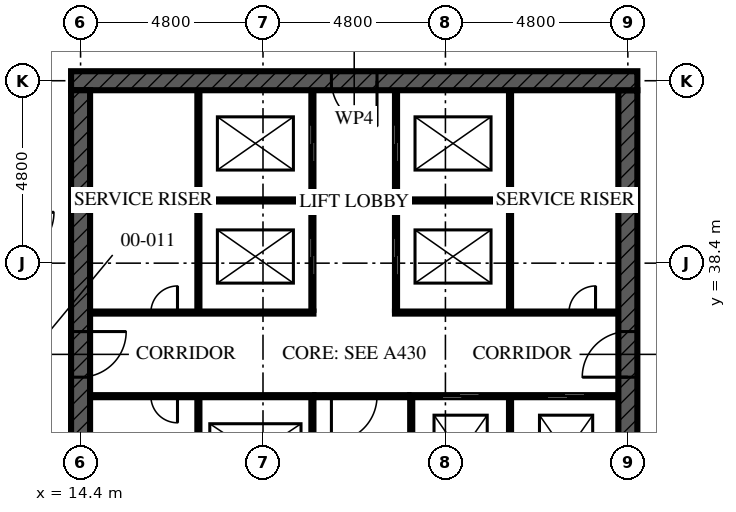
"""IFC4 building model, lengths in metres.
Left out: names, types, materials, properties, quantities, classifications, styles, units other than length and angle.
Written with IfcOpenShell. Run it as: python <this file> out.ifc"""

import sys

from ifc_helpers import new_model, si_unit, direction, frame, frame_2d, origin, place, context, subcontext, project, spatial, rectangle, extrude, element, fill, save


model = new_model("IFC4")
c1 = context("Model", 3, precision=1e-05, world=origin(), true_north=direction((0.0, 1.0)))
c2 = subcontext(c1, "Body", "Model", "MODEL_VIEW")
j1 = project(units=[si_unit("LENGTHUNIT", "METRE"), si_unit("PLANEANGLEUNIT", "RADIAN")], contexts=[c1])
p1 = place(None, origin())
s1 = spatial("IfcSite", under=j1, at=p1, CompositionType="ELEMENT")
p2 = place(p1, origin())
s2 = spatial("IfcBuilding", under=s1, at=p2, CompositionType="ELEMENT")
p3 = place(p2, origin())
s3 = spatial("IfcBuildingStorey", under=s2, at=p3, CompositionType="ELEMENT", Elevation=0.0)
p4 = place(p3, frame((29.05, 43.2, -1.8), z_axis=(0.0, 0.0, 1.0), x_axis=(-1.0, 0.0, 0.0)))
e1 = element("IfcWall", 1, at=p4, inside=s3, PredefinedType="SHEAR", context=c2, shape_type="SweptSolid", body=[
    extrude(rectangle(XDim=14.9, YDim=0.5, at=frame_2d((7.45, 0.0))), origin(), (0.0, 0.0, 1.0), 6.13),
])
p5 = place(p4, frame((6.85, 0.0, 1.8)))
e2 = element("IfcOpeningElement", 2, at=p5, cuts=e1, PredefinedType="OPENING", context=c2, shape_type="SweptSolid", body=[
    extrude(rectangle(XDim=1.2, YDim=2.1, at=frame_2d((0.6, 1.05))), frame((0.0, 0.26, 0.0), z_axis=(0.0, -1.0, 0.0), x_axis=(1.0, 0.0, 0.0)), (0.0, 0.0, 1.0), 0.521),
])
p6 = place(p3, frame((14.4, 42.95, -1.8), z_axis=(0.0, 0.0, 1.0), x_axis=(0.0, -1.0, 0.0)))
e3 = element("IfcWall", 3, at=p6, inside=s3, PredefinedType="SHEAR", context=c2, shape_type="SweptSolid", body=[
    extrude(rectangle(XDim=13.9, YDim=0.5, at=frame_2d((6.95, 0.0))), origin(), (0.0, 0.0, 1.0), 6.13),
])
p7 = place(p6, frame((6.35, 0.0, 1.8)))
e4 = element("IfcOpeningElement", 4, at=p7, cuts=e3, PredefinedType="OPENING", context=c2, shape_type="SweptSolid", body=[
    extrude(rectangle(XDim=1.2, YDim=2.1, at=frame_2d((0.6, 1.05))), frame((0.0, 0.26, 0.0), z_axis=(0.0, -1.0, 0.0), x_axis=(1.0, 0.0, 0.0)), (0.0, 0.0, 1.0), 0.521),
])
p8 = place(p3, frame((28.8, 29.05, -1.8), z_axis=(0.0, 0.0, 1.0), x_axis=(0.0, 1.0, 0.0)))
e5 = element("IfcWall", 5, at=p8, inside=s3, PredefinedType="SHEAR", context=c2, shape_type="SweptSolid", body=[
    extrude(rectangle(XDim=13.9, YDim=0.5, at=frame_2d((6.95, 0.0))), origin(), (0.0, 0.0, 1.0), 6.13),
])
p9 = place(p8, frame((6.35, 0.0, 1.8)))
e6 = element("IfcOpeningElement", 6, at=p9, cuts=e5, PredefinedType="OPENING", context=c2, shape_type="SweptSolid", body=[
    extrude(rectangle(XDim=1.2, YDim=2.1, at=frame_2d((0.6, 1.05))), frame((0.0, 0.26, 0.0), z_axis=(0.0, -1.0, 0.0), x_axis=(1.0, 0.0, 0.0)), (0.0, 0.0, 1.0), 0.521),
])
p10 = place(p3, frame((20.5, 29.05, -1.8), z_axis=(0.0, 0.0, 1.0), x_axis=(0.0, 1.0, 0.0)))
e7 = element("IfcWall", 7, at=p10, inside=s3, PredefinedType="SOLIDWALL", context=c2, shape_type="SweptSolid", body=[
    extrude(rectangle(XDim=5.8, YDim=0.1, at=frame_2d((2.9, 0.0))), origin(), (0.0, 0.0, 1.0), 6.13),
])
p11 = place(p10, frame((0.8, 0.0, 1.8)))
e8 = element("IfcOpeningElement", 8, at=p11, cuts=e7, PredefinedType="OPENING", context=c2, shape_type="SweptSolid", body=[
    extrude(rectangle(XDim=1.1, YDim=2.3, at=frame_2d((0.55, 1.15))), frame((0.0, 0.061, 0.0), z_axis=(0.0, -1.0, 0.0), x_axis=(1.0, 0.0, 0.0)), (0.0, 0.0, 1.0), 0.121),
])
p12 = place(p10, frame((3.775, 0.0, 1.8)))
e9 = element("IfcOpeningElement", 9, at=p12, cuts=e7, PredefinedType="OPENING", context=c2, shape_type="SweptSolid", body=[
    extrude(rectangle(XDim=1.1, YDim=2.3, at=frame_2d((0.55, 1.15))), frame((0.0, 0.061, 0.0), z_axis=(0.0, -1.0, 0.0), x_axis=(1.0, 0.0, 0.0)), (0.0, 0.0, 1.0), 0.121),
])
p13 = place(p3, frame((20.5, 37.15, -1.8), z_axis=(0.0, 0.0, 1.0), x_axis=(0.0, 1.0, 0.0)))
e10 = element("IfcWall", 10, at=p13, inside=s3, PredefinedType="SOLIDWALL", context=c2, shape_type="SweptSolid", body=[
    extrude(rectangle(XDim=5.8, YDim=0.1, at=frame_2d((2.9, 0.0))), origin(), (0.0, 0.0, 1.0), 6.13),
])
p14 = place(p13, frame((0.925, 0.0, 1.8)))
e11 = element("IfcOpeningElement", 11, at=p14, cuts=e10, PredefinedType="OPENING", context=c2, shape_type="SweptSolid", body=[
    extrude(rectangle(XDim=1.0, YDim=2.1, at=frame_2d((0.5, 1.05))), frame((0.0, 0.061, 0.0), z_axis=(0.0, -1.0, 0.0), x_axis=(1.0, 0.0, 0.0)), (0.0, 0.0, 1.0), 0.121),
])
p15 = place(p13, frame((3.9, 0.0, 1.8)))
e12 = element("IfcOpeningElement", 12, at=p15, cuts=e10, PredefinedType="OPENING", context=c2, shape_type="SweptSolid", body=[
    extrude(rectangle(XDim=1.0, YDim=2.1, at=frame_2d((0.5, 1.05))), frame((0.0, 0.061, 0.0), z_axis=(0.0, -1.0, 0.0), x_axis=(1.0, 0.0, 0.0)), (0.0, 0.0, 1.0), 0.121),
])
p16 = place(p3, frame((22.7, 37.15, -1.8), z_axis=(0.0, 0.0, 1.0), x_axis=(0.0, 1.0, 0.0)))
e13 = element("IfcWall", 13, at=p16, inside=s3, PredefinedType="SOLIDWALL", context=c2, shape_type="SweptSolid", body=[
    extrude(rectangle(XDim=5.8, YDim=0.1, at=frame_2d((2.9, 0.0))), origin(), (0.0, 0.0, 1.0), 6.13),
])
p17 = place(p16, frame((0.925, 0.0, 1.8)))
e14 = element("IfcOpeningElement", 14, at=p17, cuts=e13, PredefinedType="OPENING", context=c2, shape_type="SweptSolid", body=[
    extrude(rectangle(XDim=1.0, YDim=2.1, at=frame_2d((0.5, 1.05))), frame((0.0, 0.061, 0.0), z_axis=(0.0, -1.0, 0.0), x_axis=(1.0, 0.0, 0.0)), (0.0, 0.0, 1.0), 0.121),
])
p18 = place(p16, frame((3.9, 0.0, 1.8)))
e15 = element("IfcOpeningElement", 15, at=p18, cuts=e13, PredefinedType="OPENING", context=c2, shape_type="SweptSolid", body=[
    extrude(rectangle(XDim=1.0, YDim=2.1, at=frame_2d((0.5, 1.05))), frame((0.0, 0.061, 0.0), z_axis=(0.0, -1.0, 0.0), x_axis=(1.0, 0.0, 0.0)), (0.0, 0.0, 1.0), 0.121),
])
p19 = place(p3, frame((23.1, 29.05, -1.8), z_axis=(0.0, 0.0, 1.0), x_axis=(0.0, 1.0, 0.0)))
e16 = element("IfcWall", 16, at=p19, inside=s3, PredefinedType="SOLIDWALL", context=c2, shape_type="SweptSolid", body=[
    extrude(rectangle(XDim=5.8, YDim=0.1, at=frame_2d((2.9, 0.0))), origin(), (0.0, 0.0, 1.0), 6.13),
])
p20 = place(p19, frame((1.0, 0.0, 1.8)))
e17 = element("IfcOpeningElement", 17, at=p20, cuts=e16, PredefinedType="OPENING", context=c2, shape_type="SweptSolid", body=[
    extrude(rectangle(XDim=0.7, YDim=2.1, at=frame_2d((0.35, 1.05))), frame((0.0, 0.061, 0.0), z_axis=(0.0, -1.0, 0.0), x_axis=(1.0, 0.0, 0.0)), (0.0, 0.0, 1.0), 0.121),
])
p21 = place(p3, frame((14.65, 34.9, -1.8), z_axis=(0.0, 0.0, 1.0), x_axis=(1.0, 0.0, 0.0)))
e18 = element("IfcWall", 18, at=p21, inside=s3, PredefinedType="SOLIDWALL", context=c2, shape_type="SweptSolid", body=[
    extrude(rectangle(XDim=5.9, YDim=0.1, at=frame_2d((2.95, 0.0))), origin(), (0.0, 0.0, 1.0), 6.13),
])
p22 = place(p21, frame((1.6, 0.0, 1.8)))
e19 = element("IfcOpeningElement", 19, at=p22, cuts=e18, PredefinedType="OPENING", context=c2, shape_type="SweptSolid", body=[
    extrude(rectangle(XDim=0.7, YDim=2.1, at=frame_2d((0.35, 1.05))), frame((0.0, 0.061, 0.0), z_axis=(0.0, -1.0, 0.0), x_axis=(1.0, 0.0, 0.0)), (0.0, 0.0, 1.0), 0.121),
])
p23 = place(p3, frame((23.05, 34.9, -1.8), z_axis=(0.0, 0.0, 1.0), x_axis=(1.0, 0.0, 0.0)))
e20 = element("IfcWall", 20, at=p23, inside=s3, PredefinedType="SOLIDWALL", context=c2, shape_type="SweptSolid", body=[
    extrude(rectangle(XDim=5.5, YDim=0.1, at=frame_2d((2.75, 0.0))), origin(), (0.0, 0.0, 1.0), 6.13),
])
p24 = place(p23, frame((0.85, 0.0, 1.8)))
e21 = element("IfcOpeningElement", 21, at=p24, cuts=e20, PredefinedType="OPENING", context=c2, shape_type="SweptSolid", body=[
    extrude(rectangle(XDim=1.0, YDim=2.1, at=frame_2d((0.5, 1.05))), frame((0.0, 0.061, 0.0), z_axis=(0.0, -1.0, 0.0), x_axis=(1.0, 0.0, 0.0)), (0.0, 0.0, 1.0), 0.121),
])
p25 = place(p23, frame((3.625, 0.0, 1.8)))
e22 = element("IfcOpeningElement", 22, at=p25, cuts=e20, PredefinedType="OPENING", context=c2, shape_type="SweptSolid", body=[
    extrude(rectangle(XDim=1.0, YDim=2.1, at=frame_2d((0.5, 1.05))), frame((0.0, 0.061, 0.0), z_axis=(0.0, -1.0, 0.0), x_axis=(1.0, 0.0, 0.0)), (0.0, 0.0, 1.0), 0.121),
])
p26 = place(p3, frame((14.65, 37.1, -1.8), z_axis=(0.0, 0.0, 1.0), x_axis=(1.0, 0.0, 0.0)))
e23 = element("IfcWall", 23, at=p26, inside=s3, PredefinedType="SOLIDWALL", context=c2, shape_type="SweptSolid", body=[
    extrude(rectangle(XDim=5.9, YDim=0.1, at=frame_2d((2.95, 0.0))), origin(), (0.0, 0.0, 1.0), 6.13),
])
p27 = place(p26, frame((1.6, 0.0, 1.8)))
e24 = element("IfcOpeningElement", 24, at=p27, cuts=e23, PredefinedType="OPENING", context=c2, shape_type="SweptSolid", body=[
    extrude(rectangle(XDim=0.7, YDim=2.1, at=frame_2d((0.35, 1.05))), frame((0.0, 0.061, 0.0), z_axis=(0.0, -1.0, 0.0), x_axis=(1.0, 0.0, 0.0)), (0.0, 0.0, 1.0), 0.121),
])
p28 = place(p3, frame((22.65, 37.1, -1.8), z_axis=(0.0, 0.0, 1.0), x_axis=(1.0, 0.0, 0.0)))
e25 = element("IfcWall", 25, at=p28, inside=s3, PredefinedType="SOLIDWALL", context=c2, shape_type="SweptSolid", body=[
    extrude(rectangle(XDim=5.9, YDim=0.1, at=frame_2d((2.95, 0.0))), origin(), (0.0, 0.0, 1.0), 6.13),
])
p29 = place(p28, frame((4.6, 0.0, 1.8)))
e26 = element("IfcOpeningElement", 26, at=p29, cuts=e25, PredefinedType="OPENING", context=c2, shape_type="SweptSolid", body=[
    extrude(rectangle(XDim=0.7, YDim=2.1, at=frame_2d((0.35, 1.05))), frame((0.0, 0.061, 0.0), z_axis=(0.0, -1.0, 0.0), x_axis=(1.0, 0.0, 0.0)), (0.0, 0.0, 1.0), 0.121),
])
p30 = place(p3, frame((20.55, 34.9, -1.8), z_axis=(0.0, 0.0, 1.0), x_axis=(1.0, 0.0, 0.0)))
e27 = element("IfcWall", 27, at=p30, inside=s3, PredefinedType="SOLIDWALL", context=c2, shape_type="SweptSolid", body=[
    extrude(rectangle(XDim=2.5, YDim=0.1, at=frame_2d((1.25, 0.0))), origin(), (0.0, 0.0, 1.0), 6.13),
])
p31 = place(p30, frame((0.45, 0.0, 1.8)))
e28 = element("IfcOpeningElement", 28, at=p31, cuts=e27, PredefinedType="OPENING", context=c2, shape_type="SweptSolid", body=[
    extrude(rectangle(XDim=1.2, YDim=2.1, at=frame_2d((0.6, 1.05))), frame((0.0, 0.061, 0.0), z_axis=(0.0, -1.0, 0.0), x_axis=(1.0, 0.0, 0.0)), (0.0, 0.0, 1.0), 0.121),
])
for number, where, z_axis, x_axis in (
    (29, (17.5, 29.05, -1.8), (0.0, 0.0, 1.0), (0.0, 1.0, 0.0)),
    (30, (17.5, 37.15, -1.8), (0.0, 0.0, 1.0), (0.0, 1.0, 0.0)),
):
    element("IfcWall", number, at=place(p3, frame(where, z_axis=z_axis, x_axis=x_axis)), inside=s3, PredefinedType="SOLIDWALL", context=c2, shape_type="SweptSolid", body=[
        extrude(rectangle(XDim=5.8, YDim=0.1, at=frame_2d((2.9, 0.0))), origin(), (0.0, 0.0, 1.0), 6.13),
    ])
for number, where, z_axis, x_axis in (
    (31, (17.55, 40.05, -1.8), (0.0, 0.0, 1.0), (1.0, 0.0, 0.0)),
    (32, (22.75, 40.05, -1.8), (0.0, 0.0, 1.0), (1.0, 0.0, 0.0)),
):
    element("IfcWall", number, at=place(p3, frame(where, z_axis=z_axis, x_axis=x_axis)), inside=s3, PredefinedType="SOLIDWALL", context=c2, shape_type="SweptSolid", body=[
        extrude(rectangle(XDim=2.9, YDim=0.1, at=frame_2d((1.45, 0.0))), origin(), (0.0, 0.0, 1.0), 6.13),
    ])
p32 = place(p3, frame((25.7, 37.15, -1.8), z_axis=(0.0, 0.0, 1.0), x_axis=(0.0, 1.0, 0.0)))
e33 = element("IfcWall", 33, at=p32, inside=s3, PredefinedType="SOLIDWALL", context=c2, shape_type="SweptSolid", body=[
    extrude(rectangle(XDim=5.8, YDim=0.1, at=frame_2d((2.9, 0.0))), origin(), (0.0, 0.0, 1.0), 6.13),
])
p33 = place(p3, frame((25.7, 31.95, -1.8), z_axis=(0.0, 0.0, 1.0), x_axis=(0.0, 1.0, 0.0)))
e34 = element("IfcWall", 34, at=p33, inside=s3, PredefinedType="SOLIDWALL", context=c2, shape_type="SweptSolid", body=[
    extrude(rectangle(XDim=2.9, YDim=0.1, at=frame_2d((1.45, 0.0))), origin(), (0.0, 0.0, 1.0), 6.13),
])
p34 = place(p14, origin())
e35 = element("IfcDoor", 35, at=p34, inside=s3, OperationType="SLIDING_TO_LEFT", PredefinedType="DOOR", context=c2, shape_type="SweptSolid", body=[
    extrude(rectangle(XDim=1.0, YDim=2.1, at=frame_2d((0.5, 1.05))), frame((0.0, 0.05, 0.0), z_axis=(0.0, -1.0, 0.0), x_axis=(1.0, 0.0, 0.0)), (0.0, 0.0, 1.0), 0.1),
])
fill(e11, e35)
p35 = place(p15, origin())
e36 = element("IfcDoor", 36, at=p35, inside=s3, OperationType="SLIDING_TO_LEFT", PredefinedType="DOOR", context=c2, shape_type="SweptSolid", body=[
    extrude(rectangle(XDim=1.0, YDim=2.1, at=frame_2d((0.5, 1.05))), frame((0.0, 0.05, 0.0), z_axis=(0.0, -1.0, 0.0), x_axis=(1.0, 0.0, 0.0)), (0.0, 0.0, 1.0), 0.1),
])
fill(e12, e36)
p36 = place(p17, origin())
e37 = element("IfcDoor", 37, at=p36, inside=s3, OperationType="SLIDING_TO_LEFT", PredefinedType="DOOR", context=c2, shape_type="SweptSolid", body=[
    extrude(rectangle(XDim=1.0, YDim=2.1, at=frame_2d((0.5, 1.05))), frame((0.0, 0.05, 0.0), z_axis=(0.0, -1.0, 0.0), x_axis=(1.0, 0.0, 0.0)), (0.0, 0.0, 1.0), 0.1),
])
fill(e14, e37)
p37 = place(p18, origin())
e38 = element("IfcDoor", 38, at=p37, inside=s3, OperationType="SLIDING_TO_LEFT", PredefinedType="DOOR", context=c2, shape_type="SweptSolid", body=[
    extrude(rectangle(XDim=1.0, YDim=2.1, at=frame_2d((0.5, 1.05))), frame((0.0, 0.05, 0.0), z_axis=(0.0, -1.0, 0.0), x_axis=(1.0, 0.0, 0.0)), (0.0, 0.0, 1.0), 0.1),
])
fill(e15, e38)
p38 = place(p22, frame((0.7, 0.0, 0.0), z_axis=(0.0, 0.0, 1.0), x_axis=(-1.0, 0.0, 0.0)))
e39 = element("IfcDoor", 39, at=p38, inside=s3, OperationType="SINGLE_SWING_RIGHT", PredefinedType="DOOR", context=c2, shape_type="SweptSolid", body=[
    extrude(rectangle(XDim=0.7, YDim=2.1, at=frame_2d((0.35, 1.05))), frame((0.0, 0.027, 0.0), z_axis=(0.0, -1.0, 0.0), x_axis=(1.0, 0.0, 0.0)), (0.0, 0.0, 1.0), 0.054),
])
fill(e19, e39)
p39 = place(p24, origin())
e40 = element("IfcDoor", 40, at=p39, inside=s3, OperationType="SLIDING_TO_LEFT", PredefinedType="DOOR", context=c2, shape_type="SweptSolid", body=[
    extrude(rectangle(XDim=1.0, YDim=2.1, at=frame_2d((0.5, 1.05))), frame((0.0, 0.05, 0.0), z_axis=(0.0, -1.0, 0.0), x_axis=(1.0, 0.0, 0.0)), (0.0, 0.0, 1.0), 0.1),
])
fill(e21, e40)
p40 = place(p25, origin())
e41 = element("IfcDoor", 41, at=p40, inside=s3, OperationType="SLIDING_TO_LEFT", PredefinedType="DOOR", context=c2, shape_type="SweptSolid", body=[
    extrude(rectangle(XDim=1.0, YDim=2.1, at=frame_2d((0.5, 1.05))), frame((0.0, 0.05, 0.0), z_axis=(0.0, -1.0, 0.0), x_axis=(1.0, 0.0, 0.0)), (0.0, 0.0, 1.0), 0.1),
])
fill(e22, e41)
p41 = place(p27, origin())
e42 = element("IfcDoor", 42, at=p41, inside=s3, OperationType="SINGLE_SWING_LEFT", PredefinedType="DOOR", context=c2, shape_type="SweptSolid", body=[
    extrude(rectangle(XDim=0.7, YDim=2.1, at=frame_2d((0.35, 1.05))), frame((0.0, 0.027, 0.0), z_axis=(0.0, -1.0, 0.0), x_axis=(1.0, 0.0, 0.0)), (0.0, 0.0, 1.0), 0.054),
])
fill(e24, e42)
p42 = place(p29, origin())
e43 = element("IfcDoor", 43, at=p42, inside=s3, OperationType="SINGLE_SWING_LEFT", PredefinedType="DOOR", context=c2, shape_type="SweptSolid", body=[
    extrude(rectangle(XDim=0.7, YDim=2.1, at=frame_2d((0.35, 1.05))), frame((0.0, 0.027, 0.0), z_axis=(0.0, -1.0, 0.0), x_axis=(1.0, 0.0, 0.0)), (0.0, 0.0, 1.0), 0.054),
])
fill(e26, e43)
p43 = place(p31, frame((1.2, 0.0, 0.0), z_axis=(0.0, 0.0, 1.0), x_axis=(-1.0, 0.0, 0.0)))
e44 = element("IfcDoor", 44, at=p43, inside=s3, OperationType="SINGLE_SWING_LEFT", PredefinedType="DOOR", context=c2, shape_type="SweptSolid", body=[
    extrude(rectangle(XDim=1.2, YDim=2.1, at=frame_2d((0.6, 1.05))), frame((0.0, 0.027, 0.0), z_axis=(0.0, -1.0, 0.0), x_axis=(1.0, 0.0, 0.0)), (0.0, 0.0, 1.0), 0.054),
])
fill(e28, e44)
p44 = place(p7, origin())
e45 = element("IfcDoor", 45, at=p44, inside=s3, OperationType="SINGLE_SWING_LEFT", PredefinedType="DOOR", context=c2, shape_type="SweptSolid", body=[
    extrude(rectangle(XDim=1.2, YDim=2.1, at=frame_2d((0.6, 1.05))), frame((0.0, 0.027, 0.0), z_axis=(0.0, -1.0, 0.0), x_axis=(1.0, 0.0, 0.0)), (0.0, 0.0, 1.0), 0.054),
])
fill(e4, e45)
p45 = place(p9, origin())
e46 = element("IfcDoor", 46, at=p45, inside=s3, OperationType="SINGLE_SWING_LEFT", PredefinedType="DOOR", context=c2, shape_type="SweptSolid", body=[
    extrude(rectangle(XDim=1.2, YDim=2.1, at=frame_2d((0.6, 1.05))), frame((0.0, 0.027, 0.0), z_axis=(0.0, -1.0, 0.0), x_axis=(1.0, 0.0, 0.0)), (0.0, 0.0, 1.0), 0.054),
])
fill(e6, e46)
p46 = place(p5, origin())
e47 = element("IfcDoor", 47, at=p46, inside=s3, OperationType="SINGLE_SWING_LEFT", PredefinedType="DOOR", context=c2, shape_type="SweptSolid", body=[
    extrude(rectangle(XDim=1.2, YDim=2.1, at=frame_2d((0.6, 1.05))), frame((0.0, 0.027, 0.0), z_axis=(0.0, -1.0, 0.0), x_axis=(1.0, 0.0, 0.0)), (0.0, 0.0, 1.0), 0.054),
])
fill(e2, e47)
save(model, sys.argv[1])
